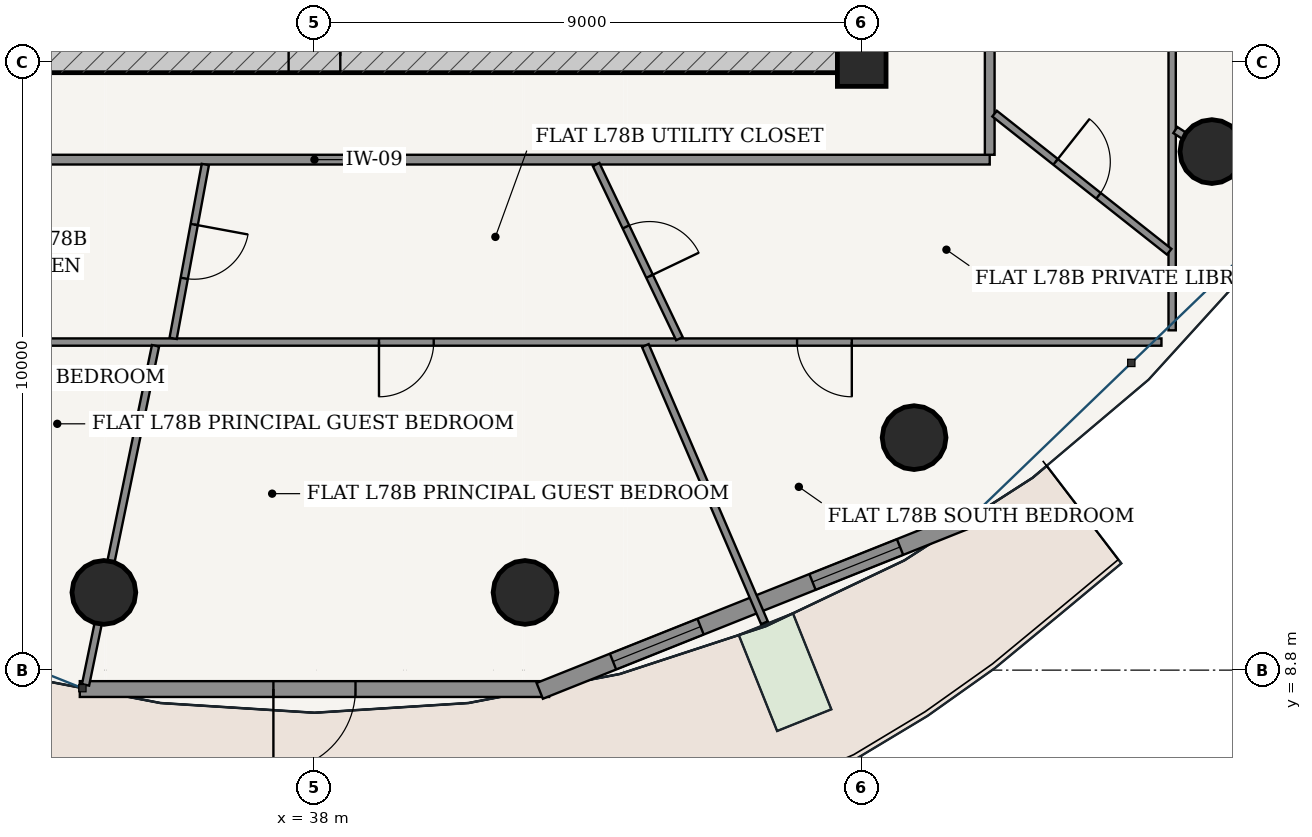
"""IFC4 building model, lengths in metres.
Left out: names, types, materials, properties, quantities, classifications, styles, units other than length and angle.
Written with IfcOpenShell. Run it as: python <this file> out.ifc"""

import sys

from ifc_helpers import new_model, si_unit, direction, frame, frame_2d, origin, origin_2d, place, context, subcontext, project, spatial, rectangle, hollow_circle, extrude, source, transform, mapped, element, fill, save


model = new_model("IFC4")
c1 = context("Model", 3, precision=1e-05, world=origin(), true_north=direction((-0.2419218956, 0.970295726276)))
c2 = subcontext(c1, "Body", "Model", "MODEL_VIEW")
j1 = project(units=[si_unit("LENGTHUNIT", "METRE"), si_unit("PLANEANGLEUNIT", "RADIAN")], contexts=[c1])
p1 = place(None, origin())
s1 = spatial("IfcSite", under=j1, at=p1, CompositionType="ELEMENT")
p2 = place(p1, origin())
s2 = spatial("IfcBuilding", under=s1, at=p2, CompositionType="ELEMENT")
p3 = place(p2, frame((0.0, 0.0, 296.95)))
s3 = spatial("IfcBuildingStorey", under=s2, at=p3, CompositionType="ELEMENT", Elevation=296.95)
p4 = place(p3, frame((47.0, 18.8, 0.0), z_axis=(0.0, 0.0, 1.0), x_axis=(1.0, 0.0, 0.0)))
e1 = element("IfcColumn", 1, at=p4, inside=s3, PredefinedType="COLUMN", context=c2, shape_type="SweptSolid", body=[
    extrude(rectangle(XDim=0.8, YDim=0.8, at=origin_2d()), origin(), (0.0, 0.0, 1.0), 3.75),
])
p5 = place(p3, frame((28.825, 18.9, 0.0), z_axis=(0.0, 0.0, 1.0), x_axis=(1.0, 0.0, 0.0)))
e2 = element("IfcWall", 2, at=p5, inside=s3, PredefinedType="SHEAR", context=c2, shape_type="SweptSolid", body=[
    extrude(rectangle(XDim=18.35, YDim=0.55, at=frame_2d((9.175, 0.0))), origin(), (0.0, 0.0, 1.0), 3.3),
])
p6 = place(p5, frame((8.75, 0.0, 0.0)))
e3 = element("IfcOpeningElement", 3, at=p6, cuts=e2, PredefinedType="OPENING", context=c2, shape_type="SweptSolid", body=[
    extrude(rectangle(XDim=0.85, YDim=2.1, at=frame_2d((0.425, 1.05))), frame((0.0, 0.285, 0.0), z_axis=(0.0, -1.0, 0.0), x_axis=(1.0, 0.0, 0.0)), (0.0, 0.0, 1.0), 0.57),
])
for number, where, z_axis, x_axis in (
    (4, (34.537, 10.078, 0.0), (0.0, 0.0, 1.0), (1.0, 0.0, 0.0)),
    (5, (41.463, 10.078, 0.0), (0.0, 0.0, 1.0), (1.0, 0.0, 0.0)),
    (6, (47.861, 12.624, 0.0), (0.0, 0.0, 1.0), (1.0, 0.0, 0.0)),
    (7, (52.759, 17.328, 0.0), (0.0, 0.0, 1.0), (1.0, 0.0, 0.0)),
):
    element("IfcColumn", number, at=place(p3, frame(where, z_axis=z_axis, x_axis=x_axis)), inside=s3, PredefinedType="COLUMN", context=c2, shape_type="SweptSolid", body=[
        extrude(hollow_circle(Radius=0.525, WallThickness=0.035, at=origin_2d()), origin(), (0.0, 0.0, 1.0), 3.75),
    ])
p7 = place(p3, frame((34.141, 8.489, 0.0), z_axis=(0.0, 0.0, 1.0), x_axis=(1.0, 0.0, 0.0)))
e8 = element("IfcWall", 8, at=p7, inside=s3, PredefinedType="SOLIDWALL", context=c2, shape_type="SweptSolid", body=[
    extrude(rectangle(XDim=7.718, YDim=0.26, at=frame_2d((3.859, 0.0))), origin(), (0.0, 0.0, 1.0), 3.3),
])
p8 = place(p7, frame((3.184, 0.0, 0.0)))
e9 = element("IfcOpeningElement", 9, at=p8, cuts=e8, PredefinedType="OPENING", context=c2, shape_type="SweptSolid", body=[
    extrude(rectangle(XDim=1.35, YDim=2.2, at=frame_2d((0.675, 1.1))), frame((0.0, 0.14, 0.0), z_axis=(0.0, -1.0, 0.0), x_axis=(1.0, 0.0, 0.0)), (0.0, 0.0, 1.0), 0.28),
])
p9 = place(p3, frame((41.705, 8.459, 0.0), z_axis=(0.0, 0.0, 1.0), x_axis=(0.92871332341, 0.370798547626, 0.0)))
e10 = element("IfcWall", 10, at=p9, inside=s3, PredefinedType="SOLIDWALL", context=c2, shape_type="SweptSolid", body=[
    extrude(rectangle(XDim=7.678, YDim=0.28, at=frame_2d((3.839, 0.0))), origin(), (0.0, 0.0, 1.0), 3.3),
])
p10 = place(p9, frame((1.298, 0.0, 0.85)))
e11 = element("IfcOpeningElement", 11, at=p10, cuts=e10, PredefinedType="OPENING", context=c2, shape_type="SweptSolid", body=[
    extrude(rectangle(XDim=1.55, YDim=1.95, at=frame_2d((0.775, 0.975))), frame((0.0, 0.15, 0.0), z_axis=(0.0, -1.0, 0.0), x_axis=(1.0, 0.0, 0.0)), (0.0, 0.0, 1.0), 0.3),
])
p11 = place(p9, frame((4.83, 0.0, 0.85)))
e12 = element("IfcOpeningElement", 12, at=p11, cuts=e10, PredefinedType="OPENING", context=c2, shape_type="SweptSolid", body=[
    extrude(rectangle(XDim=1.55, YDim=1.95, at=frame_2d((0.775, 0.975))), frame((0.0, 0.15, 0.0), z_axis=(0.0, -1.0, 0.0), x_axis=(1.0, 0.0, 0.0)), (0.0, 0.0, 1.0), 0.3),
])
p12 = place(p3, frame((26.895, 17.195, 0.0), z_axis=(0.0, 0.0, 1.0), x_axis=(1.0, 0.0, 0.0)))
e13 = element("IfcWall", 13, at=p12, inside=s3, PredefinedType="PARTITIONING", context=c2, shape_type="SweptSolid", body=[
    extrude(rectangle(XDim=22.21, YDim=0.16, at=frame_2d((11.105, 0.0))), origin(), (0.0, 0.0, 1.0), 2.825),
])
p13 = place(p12, frame((2.902, 0.0, 0.0)))
e14 = element("IfcOpeningElement", 14, at=p13, cuts=e13, PredefinedType="OPENING", context=c2, shape_type="SweptSolid", body=[
    extrude(rectangle(XDim=0.98, YDim=2.2, at=frame_2d((0.49, 1.1))), frame((0.0, 0.09, 0.0), z_axis=(0.0, -1.0, 0.0), x_axis=(1.0, 0.0, 0.0)), (0.0, 0.0, 1.0), 0.18),
])
p14 = place(p3, frame((49.105, 17.275, 0.0), z_axis=(0.0, 0.0, 1.0), x_axis=(0.0, 1.0, 0.0)))
e15 = element("IfcWall", 15, at=p14, inside=s3, PredefinedType="PARTITIONING", context=c2, shape_type="SweptSolid", body=[
    extrude(rectangle(XDim=13.925, YDim=0.16, at=frame_2d((6.962, 0.0))), origin(), (0.0, 0.0, 1.0), 2.825),
])
p15 = place(p3, frame((51.929, 14.195, 0.0), z_axis=(0.0, 0.0, 1.0), x_axis=(-1.0, 0.0, 0.0)))
e16 = element("IfcWall", 16, at=p15, inside=s3, PredefinedType="PARTITIONING", context=c2, shape_type="SweptSolid", body=[
    extrude(rectangle(XDim=27.858, YDim=0.12, at=frame_2d((13.929, 0.0))), origin(), (0.0, 0.0, 1.0), 2.825),
])
p16 = place(p15, frame((24.797, 0.0, 0.0)))
e17 = element("IfcOpeningElement", 17, at=p16, cuts=e16, PredefinedType="OPENING", context=c2, shape_type="SweptSolid", body=[
    extrude(rectangle(XDim=0.9, YDim=2.15, at=frame_2d((0.45, 1.075))), frame((0.0, 0.07, 0.0), z_axis=(0.0, -1.0, 0.0), x_axis=(1.0, 0.0, 0.0)), (0.0, 0.0, 1.0), 0.14),
])
p17 = place(p15, frame((11.968, 0.0, 0.0)))
e18 = element("IfcOpeningElement", 18, at=p17, cuts=e16, PredefinedType="OPENING", context=c2, shape_type="SweptSolid", body=[
    extrude(rectangle(XDim=0.9, YDim=2.15, at=frame_2d((0.45, 1.075))), frame((0.0, 0.07, 0.0), z_axis=(0.0, -1.0, 0.0), x_axis=(1.0, 0.0, 0.0)), (0.0, 0.0, 1.0), 0.14),
])
p18 = place(p15, frame((5.092, 0.0, 0.0)))
e19 = element("IfcOpeningElement", 19, at=p18, cuts=e16, PredefinedType="OPENING", context=c2, shape_type="SweptSolid", body=[
    extrude(rectangle(XDim=0.9, YDim=2.15, at=frame_2d((0.45, 1.075))), frame((0.0, 0.07, 0.0), z_axis=(0.0, -1.0, 0.0), x_axis=(1.0, 0.0, 0.0)), (0.0, 0.0, 1.0), 0.14),
])
p19 = place(p3, frame((52.105, 23.994, 0.0), z_axis=(0.0, 0.0, 1.0), x_axis=(0.0, -1.0, 0.0)))
e20 = element("IfcWall", 20, at=p19, inside=s3, PredefinedType="PARTITIONING", context=c2, shape_type="SweptSolid", body=[
    extrude(rectangle(XDim=9.605, YDim=0.12, at=frame_2d((4.803, 0.0))), origin(), (0.0, 0.0, 1.0), 2.65),
])
p20 = place(p19, frame((2.819, 0.0, 0.0)))
e21 = element("IfcOpeningElement", 21, at=p20, cuts=e20, PredefinedType="OPENING", context=c2, shape_type="SweptSolid", body=[
    extrude(rectangle(XDim=0.9, YDim=2.15, at=frame_2d((0.45, 1.075))), frame((0.0, 0.07, 0.0), z_axis=(0.0, -1.0, 0.0), x_axis=(1.0, 0.0, 0.0)), (0.0, 0.0, 1.0), 0.14),
])
p21 = place(p3, frame((35.386, 14.134, 0.0), z_axis=(0.0, 0.0, 1.0), x_axis=(-0.202089570669, -0.979367043262, 0.0)))
e22 = element("IfcWall", 22, at=p21, inside=s3, PredefinedType="PARTITIONING", context=c2, shape_type="SweptSolid", body=[
    extrude(rectangle(XDim=5.695, YDim=0.12, at=frame_2d((2.847, 0.0))), origin(), (0.0, 0.0, 1.0), 2.65),
])
p22 = place(p3, frame((43.441, 14.138, 0.0), z_axis=(0.0, 0.0, 1.0), x_axis=(0.394786072864, -0.918773071369, 0.0)))
e23 = element("IfcWall", 23, at=p22, inside=s3, PredefinedType="PARTITIONING", context=c2, shape_type="SweptSolid", body=[
    extrude(rectangle(XDim=4.962, YDim=0.12, at=frame_2d((2.481, 0.0))), origin(), (0.0, 0.0, 1.0), 2.931),
])
p23 = place(p3, frame((52.157, 17.682, 0.0), z_axis=(0.0, 0.0, 1.0), x_axis=(0.840690872836, -0.541515333421, 0.0)))
e24 = element("IfcWall", 24, at=p23, inside=s3, PredefinedType="PARTITIONING", context=c2, shape_type="SweptSolid", body=[
    extrude(rectangle(XDim=2.247, YDim=0.12, at=frame_2d((1.123, 0.0))), origin(), (0.0, 0.0, 1.0), 2.65),
])
p24 = place(p3, frame((36.206, 17.115, 0.0), z_axis=(0.0, 0.0, 1.0), x_axis=(-0.182194488266, -0.983262512479, 0.0)))
e25 = element("IfcWall", 25, at=p24, inside=s3, PredefinedType="PARTITIONING", context=c2, shape_type="SweptSolid", body=[
    extrude(rectangle(XDim=2.908, YDim=0.12, at=frame_2d((1.454, 0.0))), origin(), (0.0, 0.0, 1.0), 3.019),
])
p25 = place(p24, frame((1.004, 0.0, 0.0)))
e26 = element("IfcOpeningElement", 26, at=p25, cuts=e25, PredefinedType="OPENING", context=c2, shape_type="SweptSolid", body=[
    extrude(rectangle(XDim=0.9, YDim=2.15, at=frame_2d((0.45, 1.075))), frame((0.0, 0.07, 0.0), z_axis=(0.0, -1.0, 0.0), x_axis=(1.0, 0.0, 0.0)), (0.0, 0.0, 1.0), 0.14),
])
p26 = place(p3, frame((42.632, 17.115, 0.0), z_axis=(0.0, 0.0, 1.0), x_axis=(0.431425564071, -0.902148536919, 0.0)))
e27 = element("IfcWall", 27, at=p26, inside=s3, PredefinedType="PARTITIONING", context=c2, shape_type="SweptSolid", body=[
    extrude(rectangle(XDim=3.175, YDim=0.12, at=frame_2d((1.587, 0.0))), origin(), (0.0, 0.0, 1.0), 3.019),
])
p27 = place(p26, frame((1.137, 0.0, 0.0)))
e28 = element("IfcOpeningElement", 28, at=p27, cuts=e27, PredefinedType="OPENING", context=c2, shape_type="SweptSolid", body=[
    extrude(rectangle(XDim=0.9, YDim=2.15, at=frame_2d((0.45, 1.075))), frame((0.0, 0.07, 0.0), z_axis=(0.0, -1.0, 0.0), x_axis=(1.0, 0.0, 0.0)), (0.0, 0.0, 1.0), 0.14),
])
p28 = place(p3, frame((49.185, 17.952, 0.0), z_axis=(0.0, 0.0, 1.0), x_axis=(0.784266179732, -0.620424499297, 0.0)))
e29 = element("IfcWall", 29, at=p28, inside=s3, PredefinedType="PARTITIONING", context=c2, shape_type="SweptSolid", body=[
    extrude(rectangle(XDim=3.661, YDim=0.12, at=frame_2d((1.831, 0.0))), origin(), (0.0, 0.0, 1.0), 2.931),
])
p29 = place(p28, frame((1.279, 0.0, 0.0)))
e30 = element("IfcOpeningElement", 30, at=p29, cuts=e29, PredefinedType="OPENING", context=c2, shape_type="SweptSolid", body=[
    extrude(rectangle(XDim=0.9, YDim=2.15, at=frame_2d((0.45, 1.075))), frame((0.0, 0.07, 0.0), z_axis=(0.0, -1.0, 0.0), x_axis=(1.0, 0.0, 0.0)), (0.0, 0.0, 1.0), 0.14),
])
m1 = source(origin(), c2, "Body", "SweptSolid", [
    extrude(rectangle(XDim=1.35, YDim=2.2, at=frame_2d((0.675, 1.1))), frame((0.0, 0.025, 0.0), z_axis=(0.0, -1.0, 0.0), x_axis=(1.0, 0.0, 0.0)), (0.0, 0.0, 1.0), 0.05),
])
p30 = place(p8, frame((1.35, 0.0, 0.0), z_axis=(0.0, 0.0, 1.0), x_axis=(-1.0, 0.0, 0.0)))
e31 = element("IfcDoor", 31, at=p30, inside=s3, OperationType="SINGLE_SWING_RIGHT", PredefinedType="DOOR", context=c2, shape_type="MappedRepresentation", body=[
    mapped(m1, transform((0.0, 0.0, 0.0), scale=1.0)),
])
fill(e9, e31)
m2 = source(origin(), c2, "Body", "SweptSolid", [
    extrude(rectangle(XDim=1.55, YDim=1.95, at=frame_2d((0.775, 0.975))), frame((0.0, 0.03, 0.0), z_axis=(0.0, -1.0, 0.0), x_axis=(1.0, 0.0, 0.0)), (0.0, 0.0, 1.0), 0.06),
])
p31 = place(p10, origin())
e32 = element("IfcWindow", 32, at=p31, inside=s3, PartitioningType="SINGLE_PANEL", PredefinedType="WINDOW", context=c2, shape_type="MappedRepresentation", body=[
    mapped(m2, transform((0.0, 0.0, 0.0), scale=1.0)),
])
fill(e11, e32)
p32 = place(p11, origin())
e33 = element("IfcWindow", 33, at=p32, inside=s3, PartitioningType="SINGLE_PANEL", PredefinedType="WINDOW", context=c2, shape_type="MappedRepresentation", body=[
    mapped(m2, transform((0.0, 0.0, 0.0), scale=1.0)),
])
fill(e12, e33)
m3 = source(origin(), c2, "Body", "SweptSolid", [
    extrude(rectangle(XDim=0.85, YDim=2.1, at=frame_2d((0.425, 1.05))), frame((0.0, 0.025, 0.0), z_axis=(0.0, -1.0, 0.0), x_axis=(1.0, 0.0, 0.0)), (0.0, 0.0, 1.0), 0.05),
])
p33 = place(p6, origin())
e34 = element("IfcDoor", 34, at=p33, inside=s3, OperationType="SINGLE_SWING_RIGHT", PredefinedType="DOOR", context=c2, shape_type="MappedRepresentation", body=[
    mapped(m3, transform((0.0, 0.0, 0.0), scale=1.0)),
])
fill(e3, e34)
m4 = source(origin(), c2, "Body", "SweptSolid", [
    extrude(rectangle(XDim=0.9, YDim=2.15, at=frame_2d((0.45, 1.075))), frame((0.0, 0.025, 0.0), z_axis=(0.0, -1.0, 0.0), x_axis=(1.0, 0.0, 0.0)), (0.0, 0.0, 1.0), 0.05),
])
p34 = place(p25, origin())
e35 = element("IfcDoor", 35, at=p34, inside=s3, OperationType="SINGLE_SWING_LEFT", PredefinedType="DOOR", context=c2, shape_type="MappedRepresentation", body=[
    mapped(m4, transform((0.0, 0.0, 0.0), scale=1.0)),
])
fill(e26, e35)
p35 = place(p27, origin())
e36 = element("IfcDoor", 36, at=p35, inside=s3, OperationType="SINGLE_SWING_RIGHT", PredefinedType="DOOR", context=c2, shape_type="MappedRepresentation", body=[
    mapped(m4, transform((0.0, 0.0, 0.0), scale=1.0)),
])
fill(e28, e36)
p36 = place(p29, origin())
e37 = element("IfcDoor", 37, at=p36, inside=s3, OperationType="SINGLE_SWING_LEFT", PredefinedType="DOOR", context=c2, shape_type="MappedRepresentation", body=[
    mapped(m4, transform((0.0, 0.0, 0.0), scale=1.0)),
])
fill(e30, e37)
p37 = place(p17, origin())
e38 = element("IfcDoor", 38, at=p37, inside=s3, OperationType="SINGLE_SWING_RIGHT", PredefinedType="DOOR", context=c2, shape_type="MappedRepresentation", body=[
    mapped(m4, transform((0.0, 0.0, 0.0), scale=1.0)),
])
fill(e18, e38)
p38 = place(p18, origin())
e39 = element("IfcDoor", 39, at=p38, inside=s3, OperationType="SINGLE_SWING_LEFT", PredefinedType="DOOR", context=c2, shape_type="MappedRepresentation", body=[
    mapped(m4, transform((0.0, 0.0, 0.0), scale=1.0)),
])
fill(e19, e39)
save(model, sys.argv[1])
